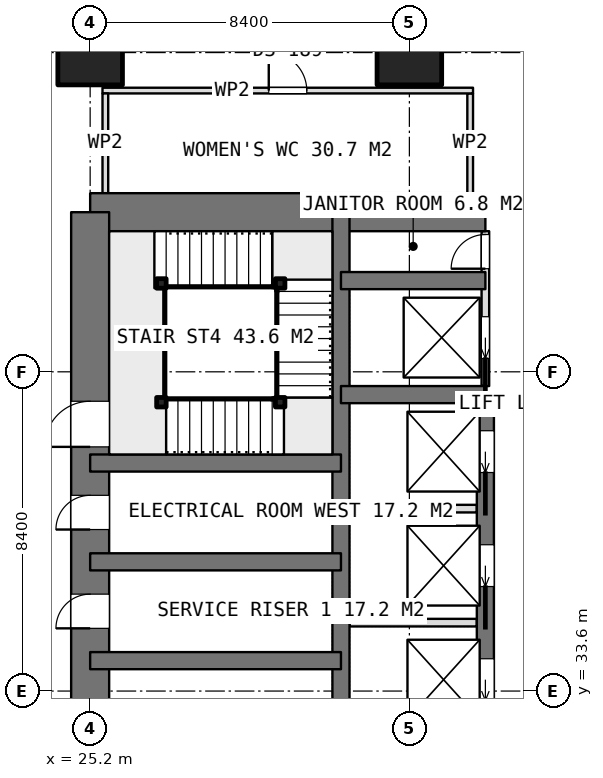
"""IFC4 building model, lengths in metres.
Left out: names, types, materials, properties, quantities, classifications, styles, units other than length and angle.
Written with IfcOpenShell. Run it as: python <this file> out.ifc"""

import sys

from ifc_helpers import new_model, si_unit, direction, frame, frame_2d, origin, origin_2d, place, context, subcontext, project, spatial, rectangle, extrude, element, fill, save


model = new_model("IFC4")
c1 = context("Model", 3, precision=1e-05, world=origin(), true_north=direction((0.0, 1.0)))
c2 = subcontext(c1, "Body", "Model", "MODEL_VIEW")
j1 = project(units=[si_unit("LENGTHUNIT", "METRE"), si_unit("PLANEANGLEUNIT", "RADIAN")], contexts=[c1])
p1 = place(None, origin())
s1 = spatial("IfcSite", under=j1, at=p1, CompositionType="ELEMENT")
p2 = place(p1, origin())
s2 = spatial("IfcBuilding", under=s1, at=p2, CompositionType="ELEMENT")
p3 = place(p2, frame((0.0, 0.0, 180.2)))
s3 = spatial("IfcBuildingStorey", under=s2, at=p3, CompositionType="ELEMENT", Elevation=180.2)
p4 = place(p3, frame((25.2, 46.2, 0.0), z_axis=(0.0, 0.0, 1.0), x_axis=(1.0, 0.0, 0.0)))
e1 = element("IfcWall", 1, at=p4, inside=s3, PredefinedType="SHEAR", context=c2, shape_type="SweptSolid", body=[
    extrude(rectangle(XDim=10.4, YDim=1.0, at=frame_2d((5.2, 0.0))), origin(), (0.0, 0.0, 1.0), 3.75),
])
p5 = place(p3, frame((25.2, 21.0, 0.0), z_axis=(0.0, 0.0, 1.0), x_axis=(0.0, 1.0, 0.0)))
e2 = element("IfcWall", 2, at=p5, inside=s3, PredefinedType="SHEAR", context=c2, shape_type="SweptSolid", body=[
    extrude(rectangle(XDim=25.2, YDim=1.0, at=frame_2d((12.6, 0.0))), origin(), (0.0, 0.0, 1.0), 3.75),
])
p6 = place(p5, frame((7.8, 0.0, 0.0)))
e3 = element("IfcOpeningElement", 3, at=p6, cuts=e2, PredefinedType="OPENING", context=c2, shape_type="SweptSolid", body=[
    extrude(rectangle(XDim=1.2, YDim=2.1, at=frame_2d((0.6, 1.05))), frame((0.0, 0.51, 0.0), z_axis=(0.0, -1.0, 0.0), x_axis=(1.0, 0.0, 0.0)), (0.0, 0.0, 1.0), 1.02),
])
p7 = place(p5, frame((14.25, 0.0, 0.0)))
e4 = element("IfcOpeningElement", 4, at=p7, cuts=e2, PredefinedType="OPENING", context=c2, shape_type="SweptSolid", body=[
    extrude(rectangle(XDim=0.9, YDim=2.1, at=frame_2d((0.45, 1.05))), frame((0.0, 0.51, 0.0), z_axis=(0.0, -1.0, 0.0), x_axis=(1.0, 0.0, 0.0)), (0.0, 0.0, 1.0), 1.02),
])
p8 = place(p5, frame((16.85, 0.0, 0.0)))
e5 = element("IfcOpeningElement", 5, at=p8, cuts=e2, PredefinedType="OPENING", context=c2, shape_type="SweptSolid", body=[
    extrude(rectangle(XDim=0.9, YDim=2.1, at=frame_2d((0.45, 1.05))), frame((0.0, 0.51, 0.0), z_axis=(0.0, -1.0, 0.0), x_axis=(1.0, 0.0, 0.0)), (0.0, 0.0, 1.0), 1.02),
])
p9 = place(p5, frame((19.025, 0.0, 0.0)))
e6 = element("IfcOpeningElement", 6, at=p9, cuts=e2, PredefinedType="OPENING", context=c2, shape_type="SweptSolid", body=[
    extrude(rectangle(XDim=1.2, YDim=2.1, at=frame_2d((0.6, 1.05))), frame((0.0, 0.51, 0.0), z_axis=(0.0, -1.0, 0.0), x_axis=(1.0, 0.0, 0.0)), (0.0, 0.0, 1.0), 1.02),
])
p10 = place(p3, frame((31.8, 21.0, 0.0), z_axis=(0.0, 0.0, 1.0), x_axis=(0.0, 1.0, 0.0)))
e7 = element("IfcWall", 7, at=p10, inside=s3, PredefinedType="SHEAR", context=c2, shape_type="SweptSolid", body=[
    extrude(rectangle(XDim=25.2, YDim=0.45, at=frame_2d((12.6, 0.0))), origin(), (0.0, 0.0, 1.0), 3.75),
])
p11 = place(p3, frame((35.6, 23.4, 0.0), z_axis=(0.0, 0.0, 1.0), x_axis=(0.0, 1.0, 0.0)))
e8 = element("IfcWall", 8, at=p11, inside=s3, PredefinedType="SHEAR", context=c2, shape_type="SweptSolid", body=[
    extrude(rectangle(XDim=18.0, YDim=0.45, at=frame_2d((9.0, 0.0))), origin(), (0.0, 0.0, 1.0), 3.75),
])
p12 = place(p11, frame((0.95, 0.0, 0.0)))
e9 = element("IfcOpeningElement", 9, at=p12, cuts=e8, PredefinedType="OPENING", context=c2, shape_type="SweptSolid", body=[
    extrude(rectangle(XDim=1.1, YDim=2.1, at=frame_2d((0.55, 1.05))), frame((0.0, 0.235, 0.0), z_axis=(0.0, -1.0, 0.0), x_axis=(1.0, 0.0, 0.0)), (0.0, 0.0, 1.0), 0.47),
])
p13 = place(p11, frame((3.95, 0.0, 0.0)))
e10 = element("IfcOpeningElement", 10, at=p13, cuts=e8, PredefinedType="OPENING", context=c2, shape_type="SweptSolid", body=[
    extrude(rectangle(XDim=1.1, YDim=2.1, at=frame_2d((0.55, 1.05))), frame((0.0, 0.235, 0.0), z_axis=(0.0, -1.0, 0.0), x_axis=(1.0, 0.0, 0.0)), (0.0, 0.0, 1.0), 0.47),
])
p14 = place(p11, frame((6.95, 0.0, 0.0)))
e11 = element("IfcOpeningElement", 11, at=p14, cuts=e8, PredefinedType="OPENING", context=c2, shape_type="SweptSolid", body=[
    extrude(rectangle(XDim=1.1, YDim=2.1, at=frame_2d((0.55, 1.05))), frame((0.0, 0.235, 0.0), z_axis=(0.0, -1.0, 0.0), x_axis=(1.0, 0.0, 0.0)), (0.0, 0.0, 1.0), 0.47),
])
p15 = place(p11, frame((9.95, 0.0, 0.0)))
e12 = element("IfcOpeningElement", 12, at=p15, cuts=e8, PredefinedType="OPENING", context=c2, shape_type="SweptSolid", body=[
    extrude(rectangle(XDim=1.1, YDim=2.1, at=frame_2d((0.55, 1.05))), frame((0.0, 0.235, 0.0), z_axis=(0.0, -1.0, 0.0), x_axis=(1.0, 0.0, 0.0)), (0.0, 0.0, 1.0), 0.47),
])
p16 = place(p11, frame((12.95, 0.0, 0.0)))
e13 = element("IfcOpeningElement", 13, at=p16, cuts=e8, PredefinedType="OPENING", context=c2, shape_type="SweptSolid", body=[
    extrude(rectangle(XDim=1.1, YDim=2.1, at=frame_2d((0.55, 1.05))), frame((0.0, 0.235, 0.0), z_axis=(0.0, -1.0, 0.0), x_axis=(1.0, 0.0, 0.0)), (0.0, 0.0, 1.0), 0.47),
])
p17 = place(p11, frame((15.95, 0.0, 0.0)))
e14 = element("IfcOpeningElement", 14, at=p17, cuts=e8, PredefinedType="OPENING", context=c2, shape_type="SweptSolid", body=[
    extrude(rectangle(XDim=1.1, YDim=2.1, at=frame_2d((0.55, 1.05))), frame((0.0, 0.235, 0.0), z_axis=(0.0, -1.0, 0.0), x_axis=(1.0, 0.0, 0.0)), (0.0, 0.0, 1.0), 0.47),
])
for number, where, z_axis, x_axis in (
    (15, (31.8, 41.4, 0.0), (0.0, 0.0, 1.0), (1.0, 0.0, 0.0)),
    (16, (31.8, 44.4, 0.0), (0.0, 0.0, 1.0), (1.0, 0.0, 0.0)),
):
    element("IfcWall", number, at=place(p3, frame(where, z_axis=z_axis, x_axis=x_axis)), inside=s3, PredefinedType="SHEAR", context=c2, shape_type="SweptSolid", body=[
        extrude(rectangle(XDim=3.8, YDim=0.45, at=frame_2d((1.9, 0.0))), origin(), (0.0, 0.0, 1.0), 3.75),
    ])
for number, where, z_axis, x_axis in (
    (17, (25.2, 34.4, 0.0), (0.0, 0.0, 1.0), (1.0, 0.0, 0.0)),
    (18, (25.2, 37.0, 0.0), (0.0, 0.0, 1.0), (1.0, 0.0, 0.0)),
    (19, (25.2, 39.6, 0.0), (0.0, 0.0, 1.0), (1.0, 0.0, 0.0)),
):
    element("IfcWall", number, at=place(p3, frame(where, z_axis=z_axis, x_axis=x_axis)), inside=s3, PredefinedType="SHEAR", context=c2, shape_type="SweptSolid", body=[
        extrude(rectangle(XDim=6.6, YDim=0.45, at=frame_2d((3.3, 0.0))), origin(), (0.0, 0.0, 1.0), 3.75),
    ])
for number, where, z_axis, x_axis in (
    (20, (25.2, 50.4, 0.0), (0.0, 0.0, 1.0), (1.0, 0.0, 0.0)),
    (21, (33.6, 50.4, 0.0), (0.0, 0.0, 1.0), (1.0, 0.0, 0.0)),
):
    element("IfcColumn", number, at=place(p3, frame(where, z_axis=z_axis, x_axis=x_axis)), inside=s3, PredefinedType="COLUMN", context=c2, shape_type="SweptSolid", body=[
        extrude(rectangle(XDim=1.7, YDim=1.7, at=origin_2d()), origin(), (0.0, 0.0, 1.0), 3.75),
    ])
for number, where, z_axis, x_axis in (
    (22, (32.025, 35.4, 0.0), (0.0, 0.0, 1.0), (1.0, 0.0, 0.0)),
    (23, (32.025, 38.4, 0.0), (0.0, 0.0, 1.0), (1.0, 0.0, 0.0)),
):
    element("IfcWall", number, at=place(p3, frame(where, z_axis=z_axis, x_axis=x_axis)), inside=s3, PredefinedType="PARTITIONING", context=c2, shape_type="SweptSolid", body=[
        extrude(rectangle(XDim=3.35, YDim=0.2, at=frame_2d((1.675, 0.0))), origin(), (0.0, 0.0, 1.0), 3.5),
    ])
p18 = place(p3, frame((35.6, 41.625, 0.0), z_axis=(0.0, 0.0, 1.0), x_axis=(0.0, 1.0, 0.0)))
e24 = element("IfcWall", 24, at=p18, inside=s3, PredefinedType="PARTITIONING", context=c2, shape_type="SweptSolid", body=[
    extrude(rectangle(XDim=4.075, YDim=0.2, at=frame_2d((2.038, 0.0))), origin(), (0.0, 0.0, 1.0), 3.5),
])
p19 = place(p18, frame((3.088, 0.0, 0.0)))
e25 = element("IfcOpeningElement", 25, at=p19, cuts=e24, PredefinedType="OPENING", context=c2, shape_type="SweptSolid", body=[
    extrude(rectangle(XDim=0.9, YDim=2.1, at=frame_2d((0.45, 1.05))), frame((0.0, 0.11, 0.0), z_axis=(0.0, -1.0, 0.0), x_axis=(1.0, 0.0, 0.0)), (0.0, 0.0, 1.0), 0.22),
])
p20 = place(p18, frame((0.725, 0.0, 0.0)))
e26 = element("IfcOpeningElement", 26, at=p20, cuts=e24, PredefinedType="OPENING", context=c2, shape_type="SweptSolid", body=[
    extrude(rectangle(XDim=1.1, YDim=2.1, at=frame_2d((0.55, 1.05))), frame((0.0, 0.11, 0.0), z_axis=(0.0, -1.0, 0.0), x_axis=(1.0, 0.0, 0.0)), (0.0, 0.0, 1.0), 0.22),
])
p21 = place(p3, frame((25.525, 49.4, 0.0), z_axis=(0.0, 0.0, 1.0), x_axis=(1.0, 0.0, 0.0)))
e27 = element("IfcWall", 27, at=p21, inside=s3, PredefinedType="PARTITIONING", context=c2, shape_type="SweptSolid", body=[
    extrude(rectangle(XDim=9.75, YDim=0.15, at=frame_2d((4.875, 0.0))), origin(), (0.0, 0.0, 1.0), 3.5),
])
p22 = place(p21, frame((4.375, 0.0, 0.0)))
e28 = element("IfcOpeningElement", 28, at=p22, cuts=e27, PredefinedType="OPENING", context=c2, shape_type="SweptSolid", body=[
    extrude(rectangle(XDim=1.0, YDim=2.1, at=frame_2d((0.5, 1.05))), frame((0.0, 0.085, 0.0), z_axis=(0.0, -1.0, 0.0), x_axis=(1.0, 0.0, 0.0)), (0.0, 0.0, 1.0), 0.17),
])
for number, where, z_axis, x_axis in (
    (29, (25.6, 46.7, 0.0), (0.0, 0.0, 1.0), (0.0, 1.0, 0.0)),
    (30, (35.2, 46.7, 0.0), (0.0, 0.0, 1.0), (0.0, 1.0, 0.0)),
):
    element("IfcWall", number, at=place(p3, frame(where, z_axis=z_axis, x_axis=x_axis)), inside=s3, PredefinedType="PARTITIONING", context=c2, shape_type="SweptSolid", body=[
        extrude(rectangle(XDim=2.625, YDim=0.15, at=frame_2d((1.312, 0.0))), origin(), (0.0, 0.0, 1.0), 3.5),
    ])
for number, where, z_axis, x_axis in (
    (31, (27.075, 41.2, 0.0), (0.0, 0.0, 1.0), (1.0, 0.0, 0.0)),
    (32, (30.2, 41.2, 0.0), (0.0, 0.0, 1.0), (1.0, 0.0, 0.0)),
    (33, (30.2, 44.325, 0.0), (0.0, 0.0, 1.0), (1.0, 0.0, 0.0)),
    (34, (27.075, 44.325, 0.0), (0.0, 0.0, 1.0), (1.0, 0.0, 0.0)),
):
    element("IfcColumn", number, at=place(p3, frame(where, z_axis=z_axis, x_axis=x_axis)), inside=s3, PredefinedType="COLUMN", context=c2, shape_type="SweptSolid", body=[
        extrude(rectangle(XDim=0.25, YDim=0.25, at=origin_2d()), origin(), (0.0, 0.0, 1.0), 3.75),
    ])
p23 = place(p7, origin())
e35 = element("IfcDoor", 35, at=p23, inside=s3, OperationType="SINGLE_SWING_LEFT", PredefinedType="DOOR", context=c2, shape_type="SweptSolid", body=[
    extrude(rectangle(XDim=0.9, YDim=2.1, at=frame_2d((0.45, 1.05))), frame((0.0, 0.025, 0.0), z_axis=(0.0, -1.0, 0.0), x_axis=(1.0, 0.0, 0.0)), (0.0, 0.0, 1.0), 0.05),
])
fill(e4, e35)
p24 = place(p8, origin())
e36 = element("IfcDoor", 36, at=p24, inside=s3, OperationType="SINGLE_SWING_LEFT", PredefinedType="DOOR", context=c2, shape_type="SweptSolid", body=[
    extrude(rectangle(XDim=0.9, YDim=2.1, at=frame_2d((0.45, 1.05))), frame((0.0, 0.025, 0.0), z_axis=(0.0, -1.0, 0.0), x_axis=(1.0, 0.0, 0.0)), (0.0, 0.0, 1.0), 0.05),
])
fill(e5, e36)
p25 = place(p19, origin())
e37 = element("IfcDoor", 37, at=p25, inside=s3, OperationType="SINGLE_SWING_LEFT", PredefinedType="DOOR", context=c2, shape_type="SweptSolid", body=[
    extrude(rectangle(XDim=0.9, YDim=2.1, at=frame_2d((0.45, 1.05))), frame((0.0, 0.025, 0.0), z_axis=(0.0, -1.0, 0.0), x_axis=(1.0, 0.0, 0.0)), (0.0, 0.0, 1.0), 0.05),
])
fill(e25, e37)
p26 = place(p15, origin())
e38 = element("IfcDoor", 38, at=p26, inside=s3, OperationType="SLIDING_TO_LEFT", PredefinedType="USERDEFINED", context=c2, shape_type="SweptSolid", body=[
    extrude(rectangle(XDim=1.1, YDim=2.1, at=frame_2d((0.55, 1.05))), frame((0.0, 0.025, 0.0), z_axis=(0.0, -1.0, 0.0), x_axis=(1.0, 0.0, 0.0)), (0.0, 0.0, 1.0), 0.05),
])
fill(e12, e38)
p27 = place(p16, origin())
e39 = element("IfcDoor", 39, at=p27, inside=s3, OperationType="SLIDING_TO_LEFT", PredefinedType="USERDEFINED", context=c2, shape_type="SweptSolid", body=[
    extrude(rectangle(XDim=1.1, YDim=2.1, at=frame_2d((0.55, 1.05))), frame((0.0, 0.025, 0.0), z_axis=(0.0, -1.0, 0.0), x_axis=(1.0, 0.0, 0.0)), (0.0, 0.0, 1.0), 0.05),
])
fill(e13, e39)
p28 = place(p17, origin())
e40 = element("IfcDoor", 40, at=p28, inside=s3, OperationType="SLIDING_TO_LEFT", PredefinedType="USERDEFINED", context=c2, shape_type="SweptSolid", body=[
    extrude(rectangle(XDim=1.1, YDim=2.1, at=frame_2d((0.55, 1.05))), frame((0.0, 0.025, 0.0), z_axis=(0.0, -1.0, 0.0), x_axis=(1.0, 0.0, 0.0)), (0.0, 0.0, 1.0), 0.05),
])
fill(e14, e40)
p29 = place(p20, origin())
e41 = element("IfcDoor", 41, at=p29, inside=s3, OperationType="SLIDING_TO_LEFT", PredefinedType="USERDEFINED", context=c2, shape_type="SweptSolid", body=[
    extrude(rectangle(XDim=1.1, YDim=2.1, at=frame_2d((0.55, 1.05))), frame((0.0, 0.025, 0.0), z_axis=(0.0, -1.0, 0.0), x_axis=(1.0, 0.0, 0.0)), (0.0, 0.0, 1.0), 0.05),
])
fill(e26, e41)
p30 = place(p22, origin())
e42 = element("IfcDoor", 42, at=p30, inside=s3, OperationType="SINGLE_SWING_LEFT", PredefinedType="DOOR", context=c2, shape_type="SweptSolid", body=[
    extrude(rectangle(XDim=1.0, YDim=2.1, at=frame_2d((0.5, 1.05))), frame((0.0, 0.025, 0.0), z_axis=(0.0, -1.0, 0.0), x_axis=(1.0, 0.0, 0.0)), (0.0, 0.0, 1.0), 0.05),
])
fill(e28, e42)
p31 = place(p9, origin())
e43 = element("IfcDoor", 43, at=p31, inside=s3, OperationType="SINGLE_SWING_RIGHT", PredefinedType="DOOR", context=c2, shape_type="SweptSolid", body=[
    extrude(rectangle(XDim=1.2, YDim=2.1, at=frame_2d((0.6, 1.05))), frame((0.0, 0.025, 0.0), z_axis=(0.0, -1.0, 0.0), x_axis=(1.0, 0.0, 0.0)), (0.0, 0.0, 1.0), 0.05),
])
fill(e6, e43)
save(model, sys.argv[1])
